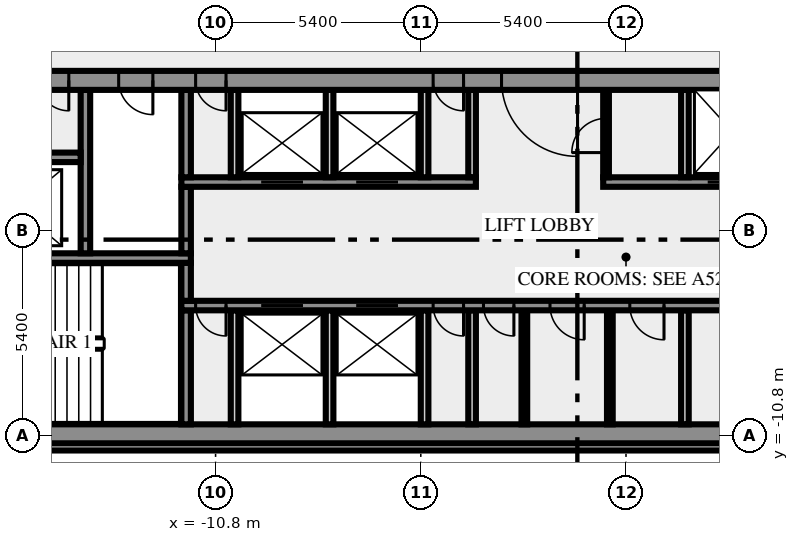
"""IFC4 building model, lengths in metres.
Left out: names, types, materials, properties, quantities, classifications, styles, units other than length and angle.
Written with IfcOpenShell. Run it as: python <this file> out.ifc"""

import sys

from ifc_helpers import new_model, si_unit, direction, frame, frame_2d, origin, place, context, subcontext, project, spatial, rectangle, extrude, element, fill, save


model = new_model("IFC4")
c1 = context("Model", 3, precision=1e-05, world=origin(), true_north=direction((0.0, 1.0)))
c2 = subcontext(c1, "Body", "Model", "MODEL_VIEW")
j1 = project(units=[si_unit("LENGTHUNIT", "METRE"), si_unit("PLANEANGLEUNIT", "RADIAN")], contexts=[c1])
p1 = place(None, origin())
s1 = spatial("IfcSite", under=j1, at=p1, CompositionType="ELEMENT")
p2 = place(p1, origin())
s2 = spatial("IfcBuilding", under=s1, at=p2, CompositionType="ELEMENT")
p3 = place(p2, frame((0.0, 0.0, 347.0)))
s3 = spatial("IfcBuildingStorey", under=s2, at=p3, CompositionType="ELEMENT", Elevation=347.0)
p4 = place(p3, frame((-17.444, -11.088, 0.0), z_axis=(0.0, 0.0, 1.0), x_axis=(1.0, 0.0, 0.0)))
e1 = element("IfcWall", 1, at=p4, inside=s3, PredefinedType="SOLIDWALL", context=c2, shape_type="SweptSolid", body=[
    extrude(rectangle(XDim=34.888, YDim=0.2, at=frame_2d((17.444, 0.0))), origin(), (0.0, 0.0, 1.0), 3.65),
])
p5 = place(p3, frame((-20.0, -10.75, 0.0), z_axis=(0.0, 0.0, 1.0), x_axis=(1.0, 0.0, 0.0)))
e2 = element("IfcWall", 2, at=p5, inside=s3, PredefinedType="SHEAR", context=c2, shape_type="SweptSolid", body=[
    extrude(rectangle(XDim=40.0, YDim=0.5, at=frame_2d((20.0, 0.0))), origin(), (0.0, 0.0, 1.0), 3.65),
])
p6 = place(p5, frame((0.8, 0.0, 1.0)))
e3 = element("IfcOpeningElement", 3, at=p6, cuts=e2, PredefinedType="OPENING", context=c2, shape_type="SweptSolid", body=[
    extrude(rectangle(XDim=1.2, YDim=1.2, at=frame_2d((0.6, 0.6))), frame((0.0, 0.26, 0.0), z_axis=(0.0, -1.0, 0.0), x_axis=(1.0, 0.0, 0.0)), (0.0, 0.0, 1.0), 0.52),
])
p7 = place(p5, frame((38.0, 0.0, 1.0)))
e4 = element("IfcOpeningElement", 4, at=p7, cuts=e2, PredefinedType="OPENING", context=c2, shape_type="SweptSolid", body=[
    extrude(rectangle(XDim=1.2, YDim=1.2, at=frame_2d((0.6, 0.6))), frame((0.0, 0.26, 0.0), z_axis=(0.0, -1.0, 0.0), x_axis=(1.0, 0.0, 0.0)), (0.0, 0.0, 1.0), 0.52),
])
p8 = place(p3, frame((-11.575, -10.5, 0.0), z_axis=(0.0, 0.0, 1.0), x_axis=(0.0, 1.0, 0.0)))
e5 = element("IfcWall", 5, at=p8, inside=s3, PredefinedType="SHEAR", context=c2, shape_type="SweptSolid", body=[
    extrude(rectangle(XDim=3.0, YDim=0.25, at=frame_2d((1.5, 0.0))), origin(), (0.0, 0.0, 1.0), 3.65),
])
for number, where, z_axis, x_axis in (
    (6, (-10.3, -10.5, 0.0), (0.0, 0.0, 1.0), (0.0, 1.0, 0.0)),
    (7, (-7.8, -10.5, 0.0), (0.0, 0.0, 1.0), (0.0, 1.0, 0.0)),
    (8, (-5.3, -10.5, 0.0), (0.0, 0.0, 1.0), (0.0, 1.0, 0.0)),
    (9, (-4.05, -10.5, 0.0), (0.0, 0.0, 1.0), (0.0, 1.0, 0.0)),
):
    element("IfcWall", number, at=place(p3, frame(where, z_axis=z_axis, x_axis=x_axis)), inside=s3, PredefinedType="SOLIDWALL", context=c2, shape_type="SweptSolid", body=[
        extrude(rectangle(XDim=3.0, YDim=0.2, at=frame_2d((1.5, 0.0))), origin(), (0.0, 0.0, 1.0), 3.65),
    ])
for number, where, z_axis, x_axis in (
    (10, (-2.675, -10.5, 0.0), (0.0, 0.0, 1.0), (0.0, 1.0, 0.0)),
    (11, (-0.425, -10.5, 0.0), (0.0, 0.0, 1.0), (0.0, 1.0, 0.0)),
):
    element("IfcWall", number, at=place(p3, frame(where, z_axis=z_axis, x_axis=x_axis)), inside=s3, PredefinedType="PARTITIONING", context=c2, shape_type="SweptSolid", body=[
        extrude(rectangle(XDim=3.0, YDim=0.15, at=frame_2d((1.5, 0.0))), origin(), (0.0, 0.0, 1.0), 3.65),
    ])
p9 = place(p3, frame((1.55, -10.5, 0.0), z_axis=(0.0, 0.0, 1.0), x_axis=(0.0, 1.0, 0.0)))
e12 = element("IfcWall", 12, at=p9, inside=s3, PredefinedType="SOLIDWALL", context=c2, shape_type="SweptSolid", body=[
    extrude(rectangle(XDim=3.0, YDim=0.2, at=frame_2d((1.5, 0.0))), origin(), (0.0, 0.0, 1.0), 3.65),
])
p10 = place(p3, frame((11.7, -7.375, 0.0), z_axis=(0.0, 0.0, 1.0), x_axis=(-1.0, 0.0, 0.0)))
e13 = element("IfcWall", 13, at=p10, inside=s3, PredefinedType="SHEAR", context=c2, shape_type="SweptSolid", body=[
    extrude(rectangle(XDim=23.4, YDim=0.25, at=frame_2d((11.7, 0.0))), origin(), (0.0, 0.0, 1.0), 3.65),
])
p11 = place(p10, frame((22.225, 0.0, 0.0)))
e14 = element("IfcOpeningElement", 14, at=p11, cuts=e13, PredefinedType="OPENING", context=c2, shape_type="SweptSolid", body=[
    extrude(rectangle(XDim=0.8, YDim=2.1, at=frame_2d((0.4, 1.05))), frame((0.0, 0.135, 0.0), z_axis=(0.0, -1.0, 0.0), x_axis=(1.0, 0.0, 0.0)), (0.0, 0.0, 1.0), 0.27),
])
p12 = place(p10, frame((20.2, 0.0, 0.0)))
e15 = element("IfcOpeningElement", 15, at=p12, cuts=e13, PredefinedType="OPENING", context=c2, shape_type="SweptSolid", body=[
    extrude(rectangle(XDim=1.1, YDim=2.1, at=frame_2d((0.55, 1.05))), frame((0.0, 0.135, 0.0), z_axis=(0.0, -1.0, 0.0), x_axis=(1.0, 0.0, 0.0)), (0.0, 0.0, 1.0), 0.27),
])
p13 = place(p10, frame((17.7, 0.0, 0.0)))
e16 = element("IfcOpeningElement", 16, at=p13, cuts=e13, PredefinedType="OPENING", context=c2, shape_type="SweptSolid", body=[
    extrude(rectangle(XDim=1.1, YDim=2.1, at=frame_2d((0.55, 1.05))), frame((0.0, 0.135, 0.0), z_axis=(0.0, -1.0, 0.0), x_axis=(1.0, 0.0, 0.0)), (0.0, 0.0, 1.0), 0.27),
])
p14 = place(p10, frame((15.975, 0.0, 0.0)))
e17 = element("IfcOpeningElement", 17, at=p14, cuts=e13, PredefinedType="OPENING", context=c2, shape_type="SweptSolid", body=[
    extrude(rectangle(XDim=0.8, YDim=2.1, at=frame_2d((0.4, 1.05))), frame((0.0, 0.135, 0.0), z_axis=(0.0, -1.0, 0.0), x_axis=(1.0, 0.0, 0.0)), (0.0, 0.0, 1.0), 0.27),
])
p15 = place(p10, frame((14.65, 0.0, 0.0)))
e18 = element("IfcOpeningElement", 18, at=p15, cuts=e13, PredefinedType="OPENING", context=c2, shape_type="SweptSolid", body=[
    extrude(rectangle(XDim=0.8, YDim=2.1, at=frame_2d((0.4, 1.05))), frame((0.0, 0.135, 0.0), z_axis=(0.0, -1.0, 0.0), x_axis=(1.0, 0.0, 0.0)), (0.0, 0.0, 1.0), 0.27),
])
p16 = place(p10, frame((12.8, 0.0, 0.0)))
e19 = element("IfcOpeningElement", 19, at=p16, cuts=e13, PredefinedType="OPENING", context=c2, shape_type="SweptSolid", body=[
    extrude(rectangle(XDim=0.9, YDim=2.1, at=frame_2d((0.45, 1.05))), frame((0.0, 0.135, 0.0), z_axis=(0.0, -1.0, 0.0), x_axis=(1.0, 0.0, 0.0)), (0.0, 0.0, 1.0), 0.27),
])
p17 = place(p10, frame((10.7, 0.0, 0.0)))
e20 = element("IfcOpeningElement", 20, at=p17, cuts=e13, PredefinedType="OPENING", context=c2, shape_type="SweptSolid", body=[
    extrude(rectangle(XDim=0.9, YDim=2.1, at=frame_2d((0.45, 1.05))), frame((0.0, 0.135, 0.0), z_axis=(0.0, -1.0, 0.0), x_axis=(1.0, 0.0, 0.0)), (0.0, 0.0, 1.0), 0.27),
])
p18 = place(p10, frame((4.7, 0.0, 0.0)))
e21 = element("IfcOpeningElement", 21, at=p18, cuts=e13, PredefinedType="OPENING", context=c2, shape_type="SweptSolid", body=[
    extrude(rectangle(XDim=0.9, YDim=2.1, at=frame_2d((0.45, 1.05))), frame((0.0, 0.135, 0.0), z_axis=(0.0, -1.0, 0.0), x_axis=(1.0, 0.0, 0.0)), (0.0, 0.0, 1.0), 0.27),
])
p19 = place(p3, frame((-11.575, -7.25, 0.0), z_axis=(0.0, 0.0, 1.0), x_axis=(0.0, 1.0, 0.0)))
e22 = element("IfcWall", 22, at=p19, inside=s3, PredefinedType="SHEAR", context=c2, shape_type="SweptSolid", body=[
    extrude(rectangle(XDim=1.0, YDim=0.25, at=frame_2d((0.5, 0.0))), origin(), (0.0, 0.0, 1.0), 3.65),
])
p20 = place(p3, frame((-11.45, -6.125, 0.0), z_axis=(0.0, 0.0, 1.0), x_axis=(-1.0, 0.0, 0.0)))
e23 = element("IfcWall", 23, at=p20, inside=s3, PredefinedType="SHEAR", context=c2, shape_type="SweptSolid", body=[
    extrude(rectangle(XDim=8.05, YDim=0.25, at=frame_2d((4.025, 0.0))), origin(), (0.0, 0.0, 1.0), 3.65),
])
p21 = place(p20, frame((6.2, 0.0, 0.0)))
e24 = element("IfcOpeningElement", 24, at=p21, cuts=e23, PredefinedType="OPENING", context=c2, shape_type="SweptSolid", body=[
    extrude(rectangle(XDim=1.8, YDim=2.1, at=frame_2d((0.9, 1.05))), frame((0.0, 0.135, 0.0), z_axis=(0.0, -1.0, 0.0), x_axis=(1.0, 0.0, 0.0)), (0.0, 0.0, 1.0), 0.27),
])
p22 = place(p3, frame((-14.225, -6.0, 0.0), z_axis=(0.0, 0.0, 1.0), x_axis=(0.0, 1.0, 0.0)))
e25 = element("IfcWall", 25, at=p22, inside=s3, PredefinedType="SHEAR", context=c2, shape_type="SweptSolid", body=[
    extrude(rectangle(XDim=4.3, YDim=0.25, at=frame_2d((2.15, 0.0))), origin(), (0.0, 0.0, 1.0), 3.65),
])
p23 = place(p3, frame((-11.575, -6.0, 0.0), z_axis=(0.0, 0.0, 1.0), x_axis=(0.0, 1.0, 0.0)))
e26 = element("IfcWall", 26, at=p23, inside=s3, PredefinedType="SHEAR", context=c2, shape_type="SweptSolid", body=[
    extrude(rectangle(XDim=1.75, YDim=0.25, at=frame_2d((0.875, 0.0))), origin(), (0.0, 0.0, 1.0), 3.65),
])
p24 = place(p3, frame((-11.7, -4.125, 0.0), z_axis=(0.0, 0.0, 1.0), x_axis=(1.0, 0.0, 0.0)))
e27 = element("IfcWall", 27, at=p24, inside=s3, PredefinedType="SHEAR", context=c2, shape_type="SweptSolid", body=[
    extrude(rectangle(XDim=7.75, YDim=0.25, at=frame_2d((3.875, 0.0))), origin(), (0.0, 0.0, 1.0), 3.65),
])
p25 = place(p24, frame((2.1, 0.0, 0.0)))
e28 = element("IfcOpeningElement", 28, at=p25, cuts=e27, PredefinedType="OPENING", context=c2, shape_type="SweptSolid", body=[
    extrude(rectangle(XDim=1.1, YDim=2.1, at=frame_2d((0.55, 1.05))), frame((0.0, 0.135, 0.0), z_axis=(0.0, -1.0, 0.0), x_axis=(1.0, 0.0, 0.0)), (0.0, 0.0, 1.0), 0.27),
])
p26 = place(p24, frame((4.6, 0.0, 0.0)))
e29 = element("IfcOpeningElement", 29, at=p26, cuts=e27, PredefinedType="OPENING", context=c2, shape_type="SweptSolid", body=[
    extrude(rectangle(XDim=1.1, YDim=2.1, at=frame_2d((0.55, 1.05))), frame((0.0, 0.135, 0.0), z_axis=(0.0, -1.0, 0.0), x_axis=(1.0, 0.0, 0.0)), (0.0, 0.0, 1.0), 0.27),
])
p27 = place(p3, frame((-0.6, -4.125, 0.0), z_axis=(0.0, 0.0, 1.0), x_axis=(1.0, 0.0, 0.0)))
e30 = element("IfcWall", 30, at=p27, inside=s3, PredefinedType="SHEAR", context=c2, shape_type="SweptSolid", body=[
    extrude(rectangle(XDim=12.3, YDim=0.25, at=frame_2d((6.15, 0.0))), origin(), (0.0, 0.0, 1.0), 3.65),
])
p28 = place(p27, frame((2.75, 0.0, 0.0)))
e31 = element("IfcOpeningElement", 31, at=p28, cuts=e30, PredefinedType="OPENING", context=c2, shape_type="SweptSolid", body=[
    extrude(rectangle(XDim=1.3, YDim=2.1, at=frame_2d((0.65, 1.05))), frame((0.0, 0.135, 0.0), z_axis=(0.0, -1.0, 0.0), x_axis=(1.0, 0.0, 0.0)), (0.0, 0.0, 1.0), 0.27),
])
p29 = place(p3, frame((-11.575, -4.0, 0.0), z_axis=(0.0, 0.0, 1.0), x_axis=(0.0, 1.0, 0.0)))
e32 = element("IfcWall", 32, at=p29, inside=s3, PredefinedType="SHEAR", context=c2, shape_type="SweptSolid", body=[
    extrude(rectangle(XDim=2.3, YDim=0.25, at=frame_2d((1.15, 0.0))), origin(), (0.0, 0.0, 1.0), 3.65),
])
for number, where, z_axis, x_axis in (
    (33, (-10.3, -4.0, 0.0), (0.0, 0.0, 1.0), (0.0, 1.0, 0.0)),
    (34, (-7.8, -4.0, 0.0), (0.0, 0.0, 1.0), (0.0, 1.0, 0.0)),
    (35, (-5.3, -4.0, 0.0), (0.0, 0.0, 1.0), (0.0, 1.0, 0.0)),
    (36, (-4.05, -4.0, 0.0), (0.0, 0.0, 1.0), (0.0, 1.0, 0.0)),
):
    element("IfcWall", number, at=place(p3, frame(where, z_axis=z_axis, x_axis=x_axis)), inside=s3, PredefinedType="SOLIDWALL", context=c2, shape_type="SweptSolid", body=[
        extrude(rectangle(XDim=2.3, YDim=0.2, at=frame_2d((1.15, 0.0))), origin(), (0.0, 0.0, 1.0), 3.65),
    ])
p30 = place(p3, frame((-0.525, -4.0, 0.0), z_axis=(0.0, 0.0, 1.0), x_axis=(0.0, 1.0, 0.0)))
e37 = element("IfcWall", 37, at=p30, inside=s3, PredefinedType="PARTITIONING", context=c2, shape_type="SweptSolid", body=[
    extrude(rectangle(XDim=2.3, YDim=0.15, at=frame_2d((1.15, 0.0))), origin(), (0.0, 0.0, 1.0), 3.65),
])
p31 = place(p30, frame((0.65, 0.0, 0.0)))
e38 = element("IfcOpeningElement", 38, at=p31, cuts=e37, PredefinedType="OPENING", context=c2, shape_type="SweptSolid", body=[
    extrude(rectangle(XDim=0.9, YDim=2.1, at=frame_2d((0.45, 1.05))), frame((0.0, 0.085, 0.0), z_axis=(0.0, -1.0, 0.0), x_axis=(1.0, 0.0, 0.0)), (0.0, 0.0, 1.0), 0.17),
])
p32 = place(p3, frame((1.55, -4.0, 0.0), z_axis=(0.0, 0.0, 1.0), x_axis=(0.0, 1.0, 0.0)))
e39 = element("IfcWall", 39, at=p32, inside=s3, PredefinedType="SOLIDWALL", context=c2, shape_type="SweptSolid", body=[
    extrude(rectangle(XDim=2.3, YDim=0.2, at=frame_2d((1.15, 0.0))), origin(), (0.0, 0.0, 1.0), 3.65),
])
p33 = place(p3, frame((-17.35, -3.475, 0.0), z_axis=(0.0, 0.0, 1.0), x_axis=(1.0, 0.0, 0.0)))
e40 = element("IfcWall", 40, at=p33, inside=s3, PredefinedType="SHEAR", context=c2, shape_type="SweptSolid", body=[
    extrude(rectangle(XDim=3.0, YDim=0.25, at=frame_2d((1.5, 0.0))), origin(), (0.0, 0.0, 1.0), 3.65),
])
p34 = place(p3, frame((20.49, -1.45, 0.0), z_axis=(0.0, 0.0, 1.0), x_axis=(-1.0, 0.0, 0.0)))
e41 = element("IfcWall", 41, at=p34, inside=s3, PredefinedType="SHEAR", context=c2, shape_type="SweptSolid", body=[
    extrude(rectangle(XDim=40.98, YDim=0.5, at=frame_2d((20.49, 0.0))), origin(), (0.0, 0.0, 1.0), 3.65),
])
p35 = place(p34, frame((38.14, 0.0, 0.0)))
e42 = element("IfcOpeningElement", 42, at=p35, cuts=e41, PredefinedType="OPENING", context=c2, shape_type="SweptSolid", body=[
    extrude(rectangle(XDim=1.8, YDim=2.1, at=frame_2d((0.9, 1.05))), frame((0.0, 0.26, 0.0), z_axis=(0.0, -1.0, 0.0), x_axis=(1.0, 0.0, 0.0)), (0.0, 0.0, 1.0), 0.52),
])
p36 = place(p34, frame((36.728, 0.0, 0.0)))
e43 = element("IfcOpeningElement", 43, at=p36, cuts=e41, PredefinedType="OPENING", context=c2, shape_type="SweptSolid", body=[
    extrude(rectangle(XDim=0.8, YDim=2.1, at=frame_2d((0.4, 1.05))), frame((0.0, 0.26, 0.0), z_axis=(0.0, -1.0, 0.0), x_axis=(1.0, 0.0, 0.0)), (0.0, 0.0, 1.0), 0.52),
])
p37 = place(p34, frame((35.153, 0.0, 0.0)))
e44 = element("IfcOpeningElement", 44, at=p37, cuts=e41, PredefinedType="OPENING", context=c2, shape_type="SweptSolid", body=[
    extrude(rectangle(XDim=0.8, YDim=2.1, at=frame_2d((0.4, 1.05))), frame((0.0, 0.26, 0.0), z_axis=(0.0, -1.0, 0.0), x_axis=(1.0, 0.0, 0.0)), (0.0, 0.0, 1.0), 0.52),
])
p38 = place(p34, frame((32.94, 0.0, 0.0)))
e45 = element("IfcOpeningElement", 45, at=p38, cuts=e41, PredefinedType="OPENING", context=c2, shape_type="SweptSolid", body=[
    extrude(rectangle(XDim=0.9, YDim=2.1, at=frame_2d((0.45, 1.05))), frame((0.0, 0.26, 0.0), z_axis=(0.0, -1.0, 0.0), x_axis=(1.0, 0.0, 0.0)), (0.0, 0.0, 1.0), 0.52),
])
p39 = place(p34, frame((31.015, 0.0, 0.0)))
e46 = element("IfcOpeningElement", 46, at=p39, cuts=e41, PredefinedType="OPENING", context=c2, shape_type="SweptSolid", body=[
    extrude(rectangle(XDim=0.8, YDim=2.1, at=frame_2d((0.4, 1.05))), frame((0.0, 0.26, 0.0), z_axis=(0.0, -1.0, 0.0), x_axis=(1.0, 0.0, 0.0)), (0.0, 0.0, 1.0), 0.52),
])
p40 = place(p34, frame((24.765, 0.0, 0.0)))
e47 = element("IfcOpeningElement", 47, at=p40, cuts=e41, PredefinedType="OPENING", context=c2, shape_type="SweptSolid", body=[
    extrude(rectangle(XDim=0.8, YDim=2.1, at=frame_2d((0.4, 1.05))), frame((0.0, 0.26, 0.0), z_axis=(0.0, -1.0, 0.0), x_axis=(1.0, 0.0, 0.0)), (0.0, 0.0, 1.0), 0.52),
])
p41 = place(p34, frame((21.765, 0.0, 0.0)))
e48 = element("IfcOpeningElement", 48, at=p41, cuts=e41, PredefinedType="OPENING", context=c2, shape_type="SweptSolid", body=[
    extrude(rectangle(XDim=2.0, YDim=2.1, at=frame_2d((1.0, 1.05))), frame((0.0, 0.26, 0.0), z_axis=(0.0, -1.0, 0.0), x_axis=(1.0, 0.0, 0.0)), (0.0, 0.0, 1.0), 0.52),
])
p42 = place(p34, frame((14.002, 0.0, 0.0)))
e49 = element("IfcOpeningElement", 49, at=p42, cuts=e41, PredefinedType="OPENING", context=c2, shape_type="SweptSolid", body=[
    extrude(rectangle(XDim=0.9, YDim=2.1, at=frame_2d((0.45, 1.05))), frame((0.0, 0.26, 0.0), z_axis=(0.0, -1.0, 0.0), x_axis=(1.0, 0.0, 0.0)), (0.0, 0.0, 1.0), 0.52),
])
p43 = place(p34, frame((10.278, 0.0, 0.0)))
e50 = element("IfcOpeningElement", 50, at=p43, cuts=e41, PredefinedType="OPENING", context=c2, shape_type="SweptSolid", body=[
    extrude(rectangle(XDim=0.9, YDim=2.1, at=frame_2d((0.45, 1.05))), frame((0.0, 0.26, 0.0), z_axis=(0.0, -1.0, 0.0), x_axis=(1.0, 0.0, 0.0)), (0.0, 0.0, 1.0), 0.52),
])
p44 = place(p34, frame((7.14, 0.0, 0.0)))
e51 = element("IfcOpeningElement", 51, at=p44, cuts=e41, PredefinedType="OPENING", context=c2, shape_type="SweptSolid", body=[
    extrude(rectangle(XDim=0.9, YDim=2.1, at=frame_2d((0.45, 1.05))), frame((0.0, 0.26, 0.0), z_axis=(0.0, -1.0, 0.0), x_axis=(1.0, 0.0, 0.0)), (0.0, 0.0, 1.0), 0.52),
])
p45 = place(p34, frame((4.19, 0.0, 0.0)))
e52 = element("IfcOpeningElement", 52, at=p45, cuts=e41, PredefinedType="OPENING", context=c2, shape_type="SweptSolid", body=[
    extrude(rectangle(XDim=0.9, YDim=2.1, at=frame_2d((0.45, 1.05))), frame((0.0, 0.26, 0.0), z_axis=(0.0, -1.0, 0.0), x_axis=(1.0, 0.0, 0.0)), (0.0, 0.0, 1.0), 0.52),
])
p46 = place(p34, frame((1.04, 0.0, 0.0)))
e53 = element("IfcOpeningElement", 53, at=p46, cuts=e41, PredefinedType="OPENING", context=c2, shape_type="SweptSolid", body=[
    extrude(rectangle(XDim=1.8, YDim=2.1, at=frame_2d((0.9, 1.05))), frame((0.0, 0.26, 0.0), z_axis=(0.0, -1.0, 0.0), x_axis=(1.0, 0.0, 0.0)), (0.0, 0.0, 1.0), 0.52),
])
p47 = place(p11, origin())
e54 = element("IfcDoor", 54, at=p47, inside=s3, OperationType="SINGLE_SWING_RIGHT", PredefinedType="DOOR", context=c2, shape_type="SweptSolid", body=[
    extrude(rectangle(XDim=0.8, YDim=2.1, at=frame_2d((0.4, 1.05))), frame((0.0, 0.025, 0.0), z_axis=(0.0, -1.0, 0.0), x_axis=(1.0, 0.0, 0.0)), (0.0, 0.0, 1.0), 0.05),
])
fill(e14, e54)
p48 = place(p12, origin())
e55 = element("IfcDoor", 55, at=p48, inside=s3, OperationType="DOUBLE_DOOR_SLIDING", PredefinedType="DOOR", context=c2, shape_type="SweptSolid", body=[
    extrude(rectangle(XDim=1.1, YDim=2.1, at=frame_2d((0.55, 1.05))), frame((0.0, 0.025, 0.0), z_axis=(0.0, -1.0, 0.0), x_axis=(1.0, 0.0, 0.0)), (0.0, 0.0, 1.0), 0.05),
])
fill(e15, e55)
p49 = place(p13, origin())
e56 = element("IfcDoor", 56, at=p49, inside=s3, OperationType="DOUBLE_DOOR_SLIDING", PredefinedType="DOOR", context=c2, shape_type="SweptSolid", body=[
    extrude(rectangle(XDim=1.1, YDim=2.1, at=frame_2d((0.55, 1.05))), frame((0.0, 0.025, 0.0), z_axis=(0.0, -1.0, 0.0), x_axis=(1.0, 0.0, 0.0)), (0.0, 0.0, 1.0), 0.05),
])
fill(e16, e56)
p50 = place(p14, origin())
e57 = element("IfcDoor", 57, at=p50, inside=s3, OperationType="SINGLE_SWING_RIGHT", PredefinedType="DOOR", context=c2, shape_type="SweptSolid", body=[
    extrude(rectangle(XDim=0.8, YDim=2.1, at=frame_2d((0.4, 1.05))), frame((0.0, 0.025, 0.0), z_axis=(0.0, -1.0, 0.0), x_axis=(1.0, 0.0, 0.0)), (0.0, 0.0, 1.0), 0.05),
])
fill(e17, e57)
p51 = place(p15, origin())
e58 = element("IfcDoor", 58, at=p51, inside=s3, OperationType="SINGLE_SWING_RIGHT", PredefinedType="DOOR", context=c2, shape_type="SweptSolid", body=[
    extrude(rectangle(XDim=0.8, YDim=2.1, at=frame_2d((0.4, 1.05))), frame((0.0, 0.025, 0.0), z_axis=(0.0, -1.0, 0.0), x_axis=(1.0, 0.0, 0.0)), (0.0, 0.0, 1.0), 0.05),
])
fill(e18, e58)
p52 = place(p16, origin())
e59 = element("IfcDoor", 59, at=p52, inside=s3, OperationType="SINGLE_SWING_RIGHT", PredefinedType="DOOR", context=c2, shape_type="SweptSolid", body=[
    extrude(rectangle(XDim=0.9, YDim=2.1, at=frame_2d((0.45, 1.05))), frame((0.0, 0.025, 0.0), z_axis=(0.0, -1.0, 0.0), x_axis=(1.0, 0.0, 0.0)), (0.0, 0.0, 1.0), 0.05),
])
fill(e19, e59)
p53 = place(p17, origin())
e60 = element("IfcDoor", 60, at=p53, inside=s3, OperationType="SINGLE_SWING_LEFT", PredefinedType="DOOR", context=c2, shape_type="SweptSolid", body=[
    extrude(rectangle(XDim=0.9, YDim=2.1, at=frame_2d((0.45, 1.05))), frame((0.0, 0.025, 0.0), z_axis=(0.0, -1.0, 0.0), x_axis=(1.0, 0.0, 0.0)), (0.0, 0.0, 1.0), 0.05),
])
fill(e20, e60)
p54 = place(p25, origin())
e61 = element("IfcDoor", 61, at=p54, inside=s3, OperationType="DOUBLE_DOOR_SLIDING", PredefinedType="DOOR", context=c2, shape_type="SweptSolid", body=[
    extrude(rectangle(XDim=1.1, YDim=2.1, at=frame_2d((0.55, 1.05))), frame((0.0, 0.025, 0.0), z_axis=(0.0, -1.0, 0.0), x_axis=(1.0, 0.0, 0.0)), (0.0, 0.0, 1.0), 0.05),
])
fill(e28, e61)
p55 = place(p26, origin())
e62 = element("IfcDoor", 62, at=p55, inside=s3, OperationType="DOUBLE_DOOR_SLIDING", PredefinedType="DOOR", context=c2, shape_type="SweptSolid", body=[
    extrude(rectangle(XDim=1.1, YDim=2.1, at=frame_2d((0.55, 1.05))), frame((0.0, 0.025, 0.0), z_axis=(0.0, -1.0, 0.0), x_axis=(1.0, 0.0, 0.0)), (0.0, 0.0, 1.0), 0.05),
])
fill(e29, e62)
p56 = place(p28, origin())
e63 = element("IfcDoor", 63, at=p56, inside=s3, OperationType="DOUBLE_DOOR_SLIDING", PredefinedType="DOOR", context=c2, shape_type="SweptSolid", body=[
    extrude(rectangle(XDim=1.3, YDim=2.1, at=frame_2d((0.65, 1.05))), frame((0.0, 0.025, 0.0), z_axis=(0.0, -1.0, 0.0), x_axis=(1.0, 0.0, 0.0)), (0.0, 0.0, 1.0), 0.05),
])
fill(e31, e63)
p57 = place(p31, origin())
e64 = element("IfcDoor", 64, at=p57, inside=s3, OperationType="SINGLE_SWING_LEFT", PredefinedType="DOOR", context=c2, shape_type="SweptSolid", body=[
    extrude(rectangle(XDim=0.9, YDim=2.1, at=frame_2d((0.45, 1.05))), frame((0.0, 0.025, 0.0), z_axis=(0.0, -1.0, 0.0), x_axis=(1.0, 0.0, 0.0)), (0.0, 0.0, 1.0), 0.05),
])
fill(e38, e64)
p58 = place(p37, origin())
e65 = element("IfcDoor", 65, at=p58, inside=s3, OperationType="SINGLE_SWING_RIGHT", PredefinedType="DOOR", context=c2, shape_type="SweptSolid", body=[
    extrude(rectangle(XDim=0.8, YDim=2.1, at=frame_2d((0.4, 1.05))), frame((0.0, 0.025, 0.0), z_axis=(0.0, -1.0, 0.0), x_axis=(1.0, 0.0, 0.0)), (0.0, 0.0, 1.0), 0.05),
])
fill(e44, e65)
p59 = place(p38, origin())
e66 = element("IfcDoor", 66, at=p59, inside=s3, OperationType="SINGLE_SWING_RIGHT", PredefinedType="DOOR", context=c2, shape_type="SweptSolid", body=[
    extrude(rectangle(XDim=0.9, YDim=2.1, at=frame_2d((0.45, 1.05))), frame((0.0, 0.025, 0.0), z_axis=(0.0, -1.0, 0.0), x_axis=(1.0, 0.0, 0.0)), (0.0, 0.0, 1.0), 0.05),
])
fill(e45, e66)
p60 = place(p39, origin())
e67 = element("IfcDoor", 67, at=p60, inside=s3, OperationType="SINGLE_SWING_RIGHT", PredefinedType="DOOR", context=c2, shape_type="SweptSolid", body=[
    extrude(rectangle(XDim=0.8, YDim=2.1, at=frame_2d((0.4, 1.05))), frame((0.0, 0.025, 0.0), z_axis=(0.0, -1.0, 0.0), x_axis=(1.0, 0.0, 0.0)), (0.0, 0.0, 1.0), 0.05),
])
fill(e46, e67)
p61 = place(p40, origin())
e68 = element("IfcDoor", 68, at=p61, inside=s3, OperationType="SINGLE_SWING_RIGHT", PredefinedType="DOOR", context=c2, shape_type="SweptSolid", body=[
    extrude(rectangle(XDim=0.8, YDim=2.1, at=frame_2d((0.4, 1.05))), frame((0.0, 0.025, 0.0), z_axis=(0.0, -1.0, 0.0), x_axis=(1.0, 0.0, 0.0)), (0.0, 0.0, 1.0), 0.05),
])
fill(e47, e68)
p62 = place(p41, origin())
e69 = element("IfcDoor", 69, at=p62, inside=s3, OperationType="DOUBLE_DOOR_SINGLE_SWING", PredefinedType="DOOR", context=c2, shape_type="SweptSolid", body=[
    extrude(rectangle(XDim=2.0, YDim=2.1, at=frame_2d((1.0, 1.05))), frame((0.0, 0.025, 0.0), z_axis=(0.0, -1.0, 0.0), x_axis=(1.0, 0.0, 0.0)), (0.0, 0.0, 1.0), 0.05),
])
fill(e48, e69)
save(model, sys.argv[1])
